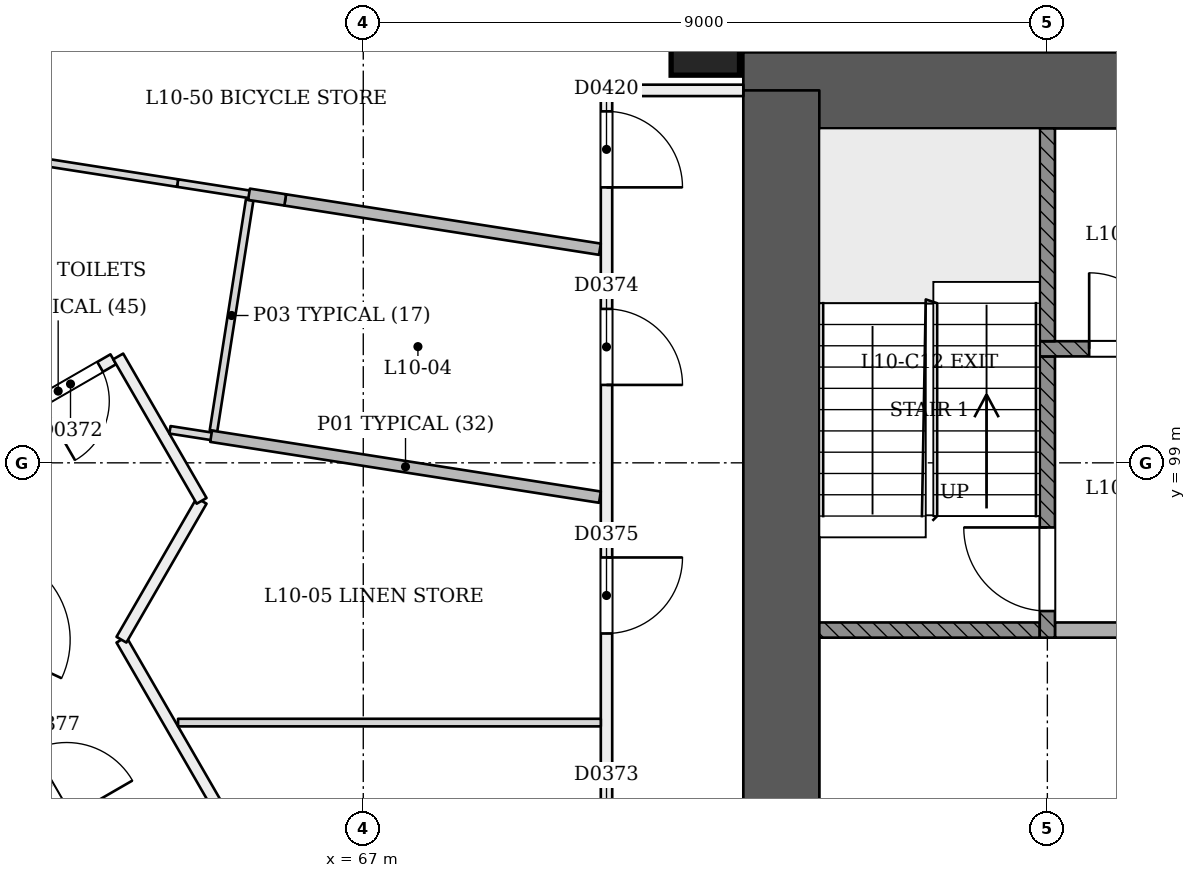
"""IFC4 building model, lengths in metres.
Left out: names, types, materials, properties, quantities, classifications, styles, units other than length and angle.
Written with IfcOpenShell. Run it as: python <this file> out.ifc"""

import sys

from ifc_helpers import new_model, si_unit, direction, frame, frame_2d, origin, origin_2d, place, context, subcontext, project, spatial, rectangle, extrude, element, fill, save


model = new_model("IFC4")
c1 = context("Model", 3, precision=1e-05, world=origin(), true_north=direction((0.0, 1.0)))
c2 = subcontext(c1, "Body", "Model", "MODEL_VIEW")
j1 = project(units=[si_unit("LENGTHUNIT", "METRE"), si_unit("PLANEANGLEUNIT", "RADIAN")], contexts=[c1])
p1 = place(None, origin())
s1 = spatial("IfcSite", under=j1, at=p1, CompositionType="ELEMENT")
p2 = place(p1, origin())
s2 = spatial("IfcBuilding", under=s1, at=p2, CompositionType="ELEMENT")
p3 = place(p2, frame((0.0, 0.0, 45.0)))
s3 = spatial("IfcBuildingStorey", under=s2, at=p3, CompositionType="ELEMENT", Elevation=45.0)
p4 = place(p3, frame((97.5, 103.9, 0.0), z_axis=(0.0, 0.0, 1.0), x_axis=(-1.0, 0.0, 0.0)))
e1 = element("IfcWall", 1, at=p4, inside=s3, PredefinedType="SHEAR", context=c2, shape_type="SweptSolid", body=[
    extrude(rectangle(XDim=25.5, YDim=1.0, at=frame_2d((12.75, 0.0))), origin(), (0.0, 0.0, 1.0), 3.6),
])
p5 = place(p3, frame((72.5, 103.9, 0.0), z_axis=(0.0, 0.0, 1.0), x_axis=(0.0, -1.0, 0.0)))
e2 = element("IfcWall", 2, at=p5, inside=s3, PredefinedType="SHEAR", context=c2, shape_type="SweptSolid", body=[
    extrude(rectangle(XDim=11.5, YDim=1.0, at=frame_2d((5.75, 0.0))), origin(), (0.0, 0.0, 1.0), 3.6),
])
p6 = place(p3, frame((71.5, 104.55, 0.0), z_axis=(0.0, 0.0, 1.0), x_axis=(1.0, 0.0, 0.0)))
e3 = element("IfcColumn", 3, at=p6, inside=s3, PredefinedType="COLUMN", context=c2, shape_type="SweptSolid", body=[
    extrude(rectangle(XDim=0.9, YDim=0.9, at=origin_2d()), origin(), (0.0, 0.0, 1.0), 3.6),
])
p7 = place(p3, frame((63.711, 100.363, 0.0), z_axis=(0.0, 0.0, 1.0), x_axis=(-0.865964676353, -0.500105168249, 0.0)))
e4 = element("IfcWall", 4, at=p7, inside=s3, PredefinedType="PARTITIONING", context=c2, shape_type="SweptSolid", body=[
    extrude(rectangle(XDim=1.675, YDim=0.15, at=frame_2d((0.837, 0.0))), origin(), (0.0, 0.0, 1.0), 3.1),
])
p8 = place(p7, frame((0.2, 0.0, 0.0)))
e5 = element("IfcOpeningElement", 5, at=p8, cuts=e4, PredefinedType="OPENING", context=c2, shape_type="SweptSolid", body=[
    extrude(rectangle(XDim=0.9, YDim=2.1, at=frame_2d((0.45, 1.05))), frame((0.0, 0.085, 0.0), z_axis=(0.0, -1.0, 0.0), x_axis=(1.0, 0.0, 0.0)), (0.0, 0.0, 1.0), 0.171),
])
p9 = place(p3, frame((66.285, 92.4, 0.0), z_axis=(0.0, 0.0, 1.0), x_axis=(-0.499986575203, 0.866033154456, 0.0)))
e6 = element("IfcWall", 6, at=p9, inside=s3, PredefinedType="PARTITIONING", context=c2, shape_type="SweptSolid", body=[
    extrude(rectangle(XDim=4.934, YDim=0.15, at=frame_2d((2.467, 0.0))), origin(), (0.0, 0.0, 1.0), 3.1),
])
p10 = place(p3, frame((70.2, 103.9, 0.0), z_axis=(0.0, 0.0, 1.0), x_axis=(0.0, -1.0, 0.0)))
e7 = element("IfcWall", 7, at=p10, inside=s3, PredefinedType="PARTITIONING", context=c2, shape_type="SweptSolid", body=[
    extrude(rectangle(XDim=11.5, YDim=0.15, at=frame_2d((5.75, 0.0))), origin(), (0.0, 0.0, 1.0), 2.6),
])
p11 = place(p10, frame((9.358, 0.0, 0.0)))
e8 = element("IfcOpeningElement", 8, at=p11, cuts=e7, PredefinedType="OPENING", context=c2, shape_type="SweptSolid", body=[
    extrude(rectangle(XDim=0.9, YDim=2.1, at=frame_2d((0.45, 1.05))), frame((0.0, 0.085, 0.0), z_axis=(0.0, -1.0, 0.0), x_axis=(1.0, 0.0, 0.0)), (0.0, 0.0, 1.0), 0.171),
])
p12 = place(p10, frame((2.875, 0.0, 0.0)))
e9 = element("IfcOpeningElement", 9, at=p12, cuts=e7, PredefinedType="OPENING", context=c2, shape_type="SweptSolid", body=[
    extrude(rectangle(XDim=1.0, YDim=2.1, at=frame_2d((0.5, 1.05))), frame((0.0, 0.085, 0.0), z_axis=(0.0, -1.0, 0.0), x_axis=(1.0, 0.0, 0.0)), (0.0, 0.0, 1.0), 0.171),
])
p13 = place(p10, frame((6.145, 0.0, 0.0)))
e10 = element("IfcOpeningElement", 10, at=p13, cuts=e7, PredefinedType="OPENING", context=c2, shape_type="SweptSolid", body=[
    extrude(rectangle(XDim=1.0, YDim=2.1, at=frame_2d((0.5, 1.05))), frame((0.0, 0.085, 0.0), z_axis=(0.0, -1.0, 0.0), x_axis=(1.0, 0.0, 0.0)), (0.0, 0.0, 1.0), 0.171),
])
p14 = place(p10, frame((0.276, 0.0, 0.0)))
e11 = element("IfcOpeningElement", 11, at=p14, cuts=e7, PredefinedType="OPENING", context=c2, shape_type="SweptSolid", body=[
    extrude(rectangle(XDim=1.0, YDim=2.1, at=frame_2d((0.5, 1.05))), frame((0.0, 0.085, 0.0), z_axis=(0.0, -1.0, 0.0), x_axis=(1.0, 0.0, 0.0)), (0.0, 0.0, 1.0), 0.171),
])
p15 = place(p3, frame((63.818, 96.673, 0.0), z_axis=(0.0, 0.0, 1.0), x_axis=(0.500059708758, 0.865990928173, 0.0)))
e12 = element("IfcWall", 12, at=p15, inside=s3, PredefinedType="PARTITIONING", context=c2, shape_type="SweptSolid", body=[
    extrude(rectangle(XDim=2.11, YDim=0.15, at=frame_2d((1.055, 0.0))), origin(), (0.0, 0.0, 1.0), 3.1),
])
p16 = place(p3, frame((64.873, 98.5, 0.0), z_axis=(0.0, 0.0, 1.0), x_axis=(-0.500005024956, 0.866022502605, 0.0)))
e13 = element("IfcWall", 13, at=p16, inside=s3, PredefinedType="PARTITIONING", context=c2, shape_type="SweptSolid", body=[
    extrude(rectangle(XDim=2.194, YDim=0.15, at=frame_2d((1.097, 0.0))), origin(), (0.0, 0.0, 1.0), 3.1),
])
p17 = place(p3, frame((61.853, 96.477, 0.0), z_axis=(0.0, 0.0, 1.0), x_axis=(0.500000327816, -0.86602521452, 0.0)))
e14 = element("IfcWall", 14, at=p17, inside=s3, PredefinedType="PARTITIONING", context=c2, shape_type="SweptSolid", body=[
    extrude(rectangle(XDim=39.979, YDim=0.15, at=frame_2d((19.99, 0.0))), origin(), (0.0, 0.0, 1.0), 2.7),
])
p18 = place(p17, frame((1.49, 0.0, 0.0)))
e15 = element("IfcOpeningElement", 15, at=p18, cuts=e14, PredefinedType="OPENING", context=c2, shape_type="SweptSolid", body=[
    extrude(rectangle(XDim=1.0, YDim=2.1, at=frame_2d((0.5, 1.05))), frame((0.0, 0.085, 0.0), z_axis=(0.0, -1.0, 0.0), x_axis=(1.0, 0.0, 0.0)), (0.0, 0.0, 1.0), 0.171),
])
p19 = place(p17, frame((4.55, 0.0, 0.0)))
e16 = element("IfcOpeningElement", 16, at=p19, cuts=e14, PredefinedType="OPENING", context=c2, shape_type="SweptSolid", body=[
    extrude(rectangle(XDim=1.1, YDim=2.1, at=frame_2d((0.55, 1.05))), frame((0.0, 0.085, 0.0), z_axis=(0.0, -1.0, 0.0), x_axis=(1.0, 0.0, 0.0)), (0.0, 0.0, 1.0), 0.171),
])
p20 = place(p17, frame((11.259, 0.0, 0.0)))
e17 = element("IfcOpeningElement", 17, at=p20, cuts=e14, PredefinedType="OPENING", context=c2, shape_type="SweptSolid", body=[
    extrude(rectangle(XDim=1.0, YDim=2.1, at=frame_2d((0.5, 1.05))), frame((0.0, 0.085, 0.0), z_axis=(0.0, -1.0, 0.0), x_axis=(1.0, 0.0, 0.0)), (0.0, 0.0, 1.0), 0.171),
])
p21 = place(p17, frame((17.979, 0.0, 0.0)))
e18 = element("IfcOpeningElement", 18, at=p21, cuts=e14, PredefinedType="OPENING", context=c2, shape_type="SweptSolid", body=[
    extrude(rectangle(XDim=1.2, YDim=2.1, at=frame_2d((0.6, 1.05))), frame((0.0, 0.085, 0.0), z_axis=(0.0, -1.0, 0.0), x_axis=(1.0, 0.0, 0.0)), (0.0, 0.0, 1.0), 0.171),
])
p22 = place(p17, frame((22.699, 0.0, 0.0)))
e19 = element("IfcOpeningElement", 19, at=p22, cuts=e14, PredefinedType="OPENING", context=c2, shape_type="SweptSolid", body=[
    extrude(rectangle(XDim=1.0, YDim=2.1, at=frame_2d((0.5, 1.05))), frame((0.0, 0.085, 0.0), z_axis=(0.0, -1.0, 0.0), x_axis=(1.0, 0.0, 0.0)), (0.0, 0.0, 1.0), 0.171),
])
p23 = place(p17, frame((29.374, 0.0, 0.0)))
e20 = element("IfcOpeningElement", 20, at=p23, cuts=e14, PredefinedType="OPENING", context=c2, shape_type="SweptSolid", body=[
    extrude(rectangle(XDim=1.0, YDim=2.1, at=frame_2d((0.5, 1.05))), frame((0.0, 0.085, 0.0), z_axis=(0.0, -1.0, 0.0), x_axis=(1.0, 0.0, 0.0)), (0.0, 0.0, 1.0), 0.171),
])
p24 = place(p17, frame((31.584, 0.0, 0.0)))
e21 = element("IfcOpeningElement", 21, at=p24, cuts=e14, PredefinedType="OPENING", context=c2, shape_type="SweptSolid", body=[
    extrude(rectangle(XDim=1.0, YDim=2.1, at=frame_2d((0.5, 1.05))), frame((0.0, 0.085, 0.0), z_axis=(0.0, -1.0, 0.0), x_axis=(1.0, 0.0, 0.0)), (0.0, 0.0, 1.0), 0.171),
])
p25 = place(p17, frame((38.374, 0.0, 0.0)))
e22 = element("IfcOpeningElement", 22, at=p25, cuts=e14, PredefinedType="OPENING", context=c2, shape_type="SweptSolid", body=[
    extrude(rectangle(XDim=1.0, YDim=2.1, at=frame_2d((0.5, 1.05))), frame((0.0, 0.085, 0.0), z_axis=(0.0, -1.0, 0.0), x_axis=(1.0, 0.0, 0.0)), (0.0, 0.0, 1.0), 0.171),
])
p26 = place(p3, frame((72.0, 103.9, 0.0), z_axis=(0.0, 0.0, 1.0), x_axis=(-1.0, 0.0, 0.0)))
e23 = element("IfcWall", 23, at=p26, inside=s3, PredefinedType="PARTITIONING", context=c2, shape_type="SweptSolid", body=[
    extrude(rectangle(XDim=1.725, YDim=0.15, at=frame_2d((0.863, 0.0))), origin(), (0.0, 0.0, 1.0), 2.6),
])
p27 = place(p3, frame((65.03, 99.421, 0.0), z_axis=(0.0, 0.0, 1.0), x_axis=(0.154701666179, 0.987961231264, 0.0)))
e24 = element("IfcWall", 24, at=p27, inside=s3, PredefinedType="PARTITIONING", context=c2, shape_type="SweptSolid", body=[
    extrude(rectangle(XDim=3.073, YDim=0.1, at=frame_2d((1.536, 0.0))), origin(), (0.0, 0.0, 1.0), 2.6),
])
p28 = place(p3, frame((64.457, 99.434, 0.0), z_axis=(0.0, 0.0, 1.0), x_axis=(0.988004117719, -0.154427534366, 0.0)))
e25 = element("IfcWall", 25, at=p28, inside=s3, PredefinedType="PARTITIONING", context=c2, shape_type="SweptSolid", body=[
    extrude(rectangle(XDim=0.588, YDim=0.1, at=frame_2d((0.294, 0.0))), origin(), (0.0, 0.0, 1.0), 3.1),
])
p29 = place(p3, frame((65.536, 102.527, 0.0), z_axis=(0.0, 0.0, 1.0), x_axis=(-0.987969741582, 0.154647307506, 0.0)))
e26 = element("IfcWall", 26, at=p29, inside=s3, PredefinedType="PARTITIONING", context=c2, shape_type="SweptSolid", body=[
    extrude(rectangle(XDim=0.991, YDim=0.1, at=frame_2d((0.496, 0.0))), origin(), (0.0, 0.0, 1.0), 2.6),
])
p30 = place(p3, frame((64.557, 102.681, 0.0), z_axis=(0.0, 0.0, 1.0), x_axis=(-0.987956876752, 0.154729472561, 0.0)))
e27 = element("IfcWall", 27, at=p30, inside=s3, PredefinedType="PARTITIONING", context=c2, shape_type="SweptSolid", body=[
    extrude(rectangle(XDim=4.647, YDim=0.1, at=frame_2d((2.323, 0.0))), origin(), (0.0, 0.0, 1.0), 3.1),
])
p31 = place(p3, frame((70.125, 95.583, 0.0), z_axis=(0.0, 0.0, 1.0), x_axis=(-1.0, 0.0, 0.0)))
e28 = element("IfcWall", 28, at=p31, inside=s3, PredefinedType="PARTITIONING", context=c2, shape_type="SweptSolid", body=[
    extrude(rectangle(XDim=5.562, YDim=0.1, at=frame_2d((2.781, 0.0))), origin(), (0.0, 0.0, 1.0), 3.1),
])
p32 = place(p3, frame((64.998, 99.35, 0.0), z_axis=(0.0, 0.0, 1.0), x_axis=(0.987958705643, -0.154717794531, 0.0)))
e29 = element("IfcWall", 29, at=p32, inside=s3, PredefinedType="PARTITIONING", context=c2, shape_type="SweptSolid", body=[
    extrude(rectangle(XDim=5.177, YDim=0.15, at=frame_2d((2.589, 0.0))), origin(), (0.0, 0.0, 1.0), 3.1),
])
p33 = place(p3, frame((70.113, 101.81, 0.0), z_axis=(0.0, 0.0, 1.0), x_axis=(-0.987957270298, 0.154726959721, 0.0)))
e30 = element("IfcWall", 30, at=p33, inside=s3, PredefinedType="PARTITIONING", context=c2, shape_type="SweptSolid", body=[
    extrude(rectangle(XDim=4.191, YDim=0.15, at=frame_2d((2.095, 0.0))), origin(), (0.0, 0.0, 1.0), 3.1),
])
p34 = place(p3, frame((65.973, 102.459, 0.0), z_axis=(0.0, 0.0, 1.0), x_axis=(-0.9879103998, 0.155025939661, 0.0)))
e31 = element("IfcWall", 31, at=p34, inside=s3, PredefinedType="PARTITIONING", context=c2, shape_type="SweptSolid", body=[
    extrude(rectangle(XDim=0.482, YDim=0.15, at=frame_2d((0.241, 0.0))), origin(), (0.0, 0.0, 1.0), 2.6),
])
p35 = place(p3, frame((73.0, 96.8, 0.0), z_axis=(0.0, 0.0, 1.0), x_axis=(1.0, 0.0, 0.0)))
e32 = element("IfcWall", 32, at=p35, inside=s3, PredefinedType="SOLIDWALL", context=c2, shape_type="SweptSolid", body=[
    extrude(rectangle(XDim=2.9, YDim=0.2, at=frame_2d((1.45, 0.0))), origin(), (0.0, 0.0, 1.0), 3.1),
])
p36 = place(p3, frame((76.0, 96.7, 0.0), z_axis=(0.0, 0.0, 1.0), x_axis=(0.0, 1.0, 0.0)))
e33 = element("IfcWall", 33, at=p36, inside=s3, PredefinedType="SOLIDWALL", context=c2, shape_type="SweptSolid", body=[
    extrude(rectangle(XDim=3.7, YDim=0.2, at=frame_2d((1.85, 0.0))), origin(), (0.0, 0.0, 1.0), 3.1),
])
p37 = place(p36, frame((0.35, 0.0, 0.0)))
e34 = element("IfcOpeningElement", 34, at=p37, cuts=e33, PredefinedType="OPENING", context=c2, shape_type="SweptSolid", body=[
    extrude(rectangle(XDim=1.1, YDim=2.1, at=frame_2d((0.55, 1.05))), frame((0.0, 0.11, 0.0), z_axis=(0.0, -1.0, 0.0), x_axis=(1.0, 0.0, 0.0)), (0.0, 0.0, 1.0), 0.221),
])
p38 = place(p3, frame((76.1, 96.8, 0.0), z_axis=(0.0, 0.0, 1.0), x_axis=(1.0, 0.0, 0.0)))
e35 = element("IfcWall", 35, at=p38, inside=s3, PredefinedType="PARTITIONING", context=c2, shape_type="SweptSolid", body=[
    extrude(rectangle(XDim=1.9, YDim=0.2, at=frame_2d((0.95, 0.0))), origin(), (0.0, 0.0, 1.0), 3.1),
])
p39 = place(p3, frame((75.9, 100.5, 0.0), z_axis=(0.0, 0.0, 1.0), x_axis=(1.0, 0.0, 0.0)))
e36 = element("IfcWall", 36, at=p39, inside=s3, PredefinedType="SOLIDWALL", context=c2, shape_type="SweptSolid", body=[
    extrude(rectangle(XDim=18.2, YDim=0.2, at=frame_2d((9.1, 0.0))), origin(), (0.0, 0.0, 1.0), 3.1),
])
p40 = place(p39, frame((2.6, 0.0, 0.0)))
e37 = element("IfcOpeningElement", 37, at=p40, cuts=e36, PredefinedType="OPENING", context=c2, shape_type="SweptSolid", body=[
    extrude(rectangle(XDim=1.1, YDim=2.1, at=frame_2d((0.55, 1.05))), frame((0.0, 0.11, 0.0), z_axis=(0.0, -1.0, 0.0), x_axis=(1.0, 0.0, 0.0)), (0.0, 0.0, 1.0), 0.221),
])
p41 = place(p39, frame((4.5, 0.0, 0.0)))
e38 = element("IfcOpeningElement", 38, at=p41, cuts=e36, PredefinedType="OPENING", context=c2, shape_type="SweptSolid", body=[
    extrude(rectangle(XDim=1.1, YDim=2.1, at=frame_2d((0.55, 1.05))), frame((0.0, 0.11, 0.0), z_axis=(0.0, -1.0, 0.0), x_axis=(1.0, 0.0, 0.0)), (0.0, 0.0, 1.0), 0.221),
])
p42 = place(p39, frame((6.4, 0.0, 0.0)))
e39 = element("IfcOpeningElement", 39, at=p42, cuts=e36, PredefinedType="OPENING", context=c2, shape_type="SweptSolid", body=[
    extrude(rectangle(XDim=1.1, YDim=2.1, at=frame_2d((0.55, 1.05))), frame((0.0, 0.11, 0.0), z_axis=(0.0, -1.0, 0.0), x_axis=(1.0, 0.0, 0.0)), (0.0, 0.0, 1.0), 0.221),
])
p43 = place(p39, frame((8.3, 0.0, 0.0)))
e40 = element("IfcOpeningElement", 40, at=p43, cuts=e36, PredefinedType="OPENING", context=c2, shape_type="SweptSolid", body=[
    extrude(rectangle(XDim=1.1, YDim=2.1, at=frame_2d((0.55, 1.05))), frame((0.0, 0.11, 0.0), z_axis=(0.0, -1.0, 0.0), x_axis=(1.0, 0.0, 0.0)), (0.0, 0.0, 1.0), 0.221),
])
p44 = place(p39, frame((10.2, 0.0, 0.0)))
e41 = element("IfcOpeningElement", 41, at=p44, cuts=e36, PredefinedType="OPENING", context=c2, shape_type="SweptSolid", body=[
    extrude(rectangle(XDim=1.1, YDim=2.1, at=frame_2d((0.55, 1.05))), frame((0.0, 0.11, 0.0), z_axis=(0.0, -1.0, 0.0), x_axis=(1.0, 0.0, 0.0)), (0.0, 0.0, 1.0), 0.221),
])
p45 = place(p39, frame((12.1, 0.0, 0.0)))
e42 = element("IfcOpeningElement", 42, at=p45, cuts=e36, PredefinedType="OPENING", context=c2, shape_type="SweptSolid", body=[
    extrude(rectangle(XDim=1.1, YDim=2.1, at=frame_2d((0.55, 1.05))), frame((0.0, 0.11, 0.0), z_axis=(0.0, -1.0, 0.0), x_axis=(1.0, 0.0, 0.0)), (0.0, 0.0, 1.0), 0.221),
])
p46 = place(p39, frame((14.0, 0.0, 0.0)))
e43 = element("IfcOpeningElement", 43, at=p46, cuts=e36, PredefinedType="OPENING", context=c2, shape_type="SweptSolid", body=[
    extrude(rectangle(XDim=1.1, YDim=2.1, at=frame_2d((0.55, 1.05))), frame((0.0, 0.11, 0.0), z_axis=(0.0, -1.0, 0.0), x_axis=(1.0, 0.0, 0.0)), (0.0, 0.0, 1.0), 0.221),
])
p47 = place(p39, frame((0.65, 0.0, 0.0)))
e44 = element("IfcOpeningElement", 44, at=p47, cuts=e36, PredefinedType="OPENING", context=c2, shape_type="SweptSolid", body=[
    extrude(rectangle(XDim=1.0, YDim=2.1, at=frame_2d((0.5, 1.05))), frame((0.0, 0.11, 0.0), z_axis=(0.0, -1.0, 0.0), x_axis=(1.0, 0.0, 0.0)), (0.0, 0.0, 1.0), 0.221),
])
p48 = place(p39, frame((16.3, 0.0, 0.0)))
e45 = element("IfcOpeningElement", 45, at=p48, cuts=e36, PredefinedType="OPENING", context=c2, shape_type="SweptSolid", body=[
    extrude(rectangle(XDim=1.0, YDim=2.1, at=frame_2d((0.5, 1.05))), frame((0.0, 0.11, 0.0), z_axis=(0.0, -1.0, 0.0), x_axis=(1.0, 0.0, 0.0)), (0.0, 0.0, 1.0), 0.221),
])
p49 = place(p3, frame((76.0, 100.6, 0.0), z_axis=(0.0, 0.0, 1.0), x_axis=(0.0, 1.0, 0.0)))
e46 = element("IfcWall", 46, at=p49, inside=s3, PredefinedType="SOLIDWALL", context=c2, shape_type="SweptSolid", body=[
    extrude(rectangle(XDim=2.8, YDim=0.2, at=frame_2d((1.4, 0.0))), origin(), (0.0, 0.0, 1.0), 3.1),
])
p50 = place(p8, origin())
e47 = element("IfcDoor", 47, at=p50, inside=s3, OperationType="SINGLE_SWING_RIGHT", PredefinedType="NOTDEFINED", context=c2, shape_type="SweptSolid", body=[
    extrude(rectangle(XDim=0.9, YDim=2.1, at=frame_2d((0.45, 1.05))), frame((0.0, 0.025, 0.0), z_axis=(0.0, -1.0, 0.0), x_axis=(1.0, 0.0, 0.0)), (0.0, 0.0, 1.0), 0.05),
])
fill(e5, e47)
p51 = place(p12, origin())
e48 = element("IfcDoor", 48, at=p51, inside=s3, OperationType="SINGLE_SWING_RIGHT", PredefinedType="NOTDEFINED", context=c2, shape_type="SweptSolid", body=[
    extrude(rectangle(XDim=1.0, YDim=2.1, at=frame_2d((0.5, 1.05))), frame((0.0, 0.025, 0.0), z_axis=(0.0, -1.0, 0.0), x_axis=(1.0, 0.0, 0.0)), (0.0, 0.0, 1.0), 0.05),
])
fill(e9, e48)
p52 = place(p13, origin())
e49 = element("IfcDoor", 49, at=p52, inside=s3, OperationType="SINGLE_SWING_LEFT", PredefinedType="NOTDEFINED", context=c2, shape_type="SweptSolid", body=[
    extrude(rectangle(XDim=1.0, YDim=2.1, at=frame_2d((0.5, 1.05))), frame((0.0, 0.025, 0.0), z_axis=(0.0, -1.0, 0.0), x_axis=(1.0, 0.0, 0.0)), (0.0, 0.0, 1.0), 0.05),
])
fill(e10, e49)
p53 = place(p18, origin())
e50 = element("IfcDoor", 50, at=p53, inside=s3, OperationType="SINGLE_SWING_RIGHT", PredefinedType="NOTDEFINED", context=c2, shape_type="SweptSolid", body=[
    extrude(rectangle(XDim=1.0, YDim=2.1, at=frame_2d((0.5, 1.05))), frame((0.0, 0.025, 0.0), z_axis=(0.0, -1.0, 0.0), x_axis=(1.0, 0.0, 0.0)), (0.0, 0.0, 1.0), 0.05),
])
fill(e15, e50)
p54 = place(p14, origin())
e51 = element("IfcDoor", 51, at=p54, inside=s3, OperationType="SINGLE_SWING_RIGHT", PredefinedType="NOTDEFINED", context=c2, shape_type="SweptSolid", body=[
    extrude(rectangle(XDim=1.0, YDim=2.1, at=frame_2d((0.5, 1.05))), frame((0.0, 0.025, 0.0), z_axis=(0.0, -1.0, 0.0), x_axis=(1.0, 0.0, 0.0)), (0.0, 0.0, 1.0), 0.05),
])
fill(e11, e51)
p55 = place(p37, origin())
e52 = element("IfcDoor", 52, at=p55, inside=s3, OperationType="SINGLE_SWING_RIGHT", PredefinedType="NOTDEFINED", context=c2, shape_type="SweptSolid", body=[
    extrude(rectangle(XDim=1.1, YDim=2.1, at=frame_2d((0.55, 1.05))), frame((0.0, 0.025, 0.0), z_axis=(0.0, -1.0, 0.0), x_axis=(1.0, 0.0, 0.0)), (0.0, 0.0, 1.0), 0.05),
])
fill(e34, e52)
p56 = place(p47, origin())
e53 = element("IfcDoor", 53, at=p56, inside=s3, OperationType="SINGLE_SWING_LEFT", PredefinedType="NOTDEFINED", context=c2, shape_type="SweptSolid", body=[
    extrude(rectangle(XDim=1.0, YDim=2.1, at=frame_2d((0.5, 1.05))), frame((0.0, 0.025, 0.0), z_axis=(0.0, -1.0, 0.0), x_axis=(1.0, 0.0, 0.0)), (0.0, 0.0, 1.0), 0.05),
])
fill(e44, e53)
save(model, sys.argv[1])
